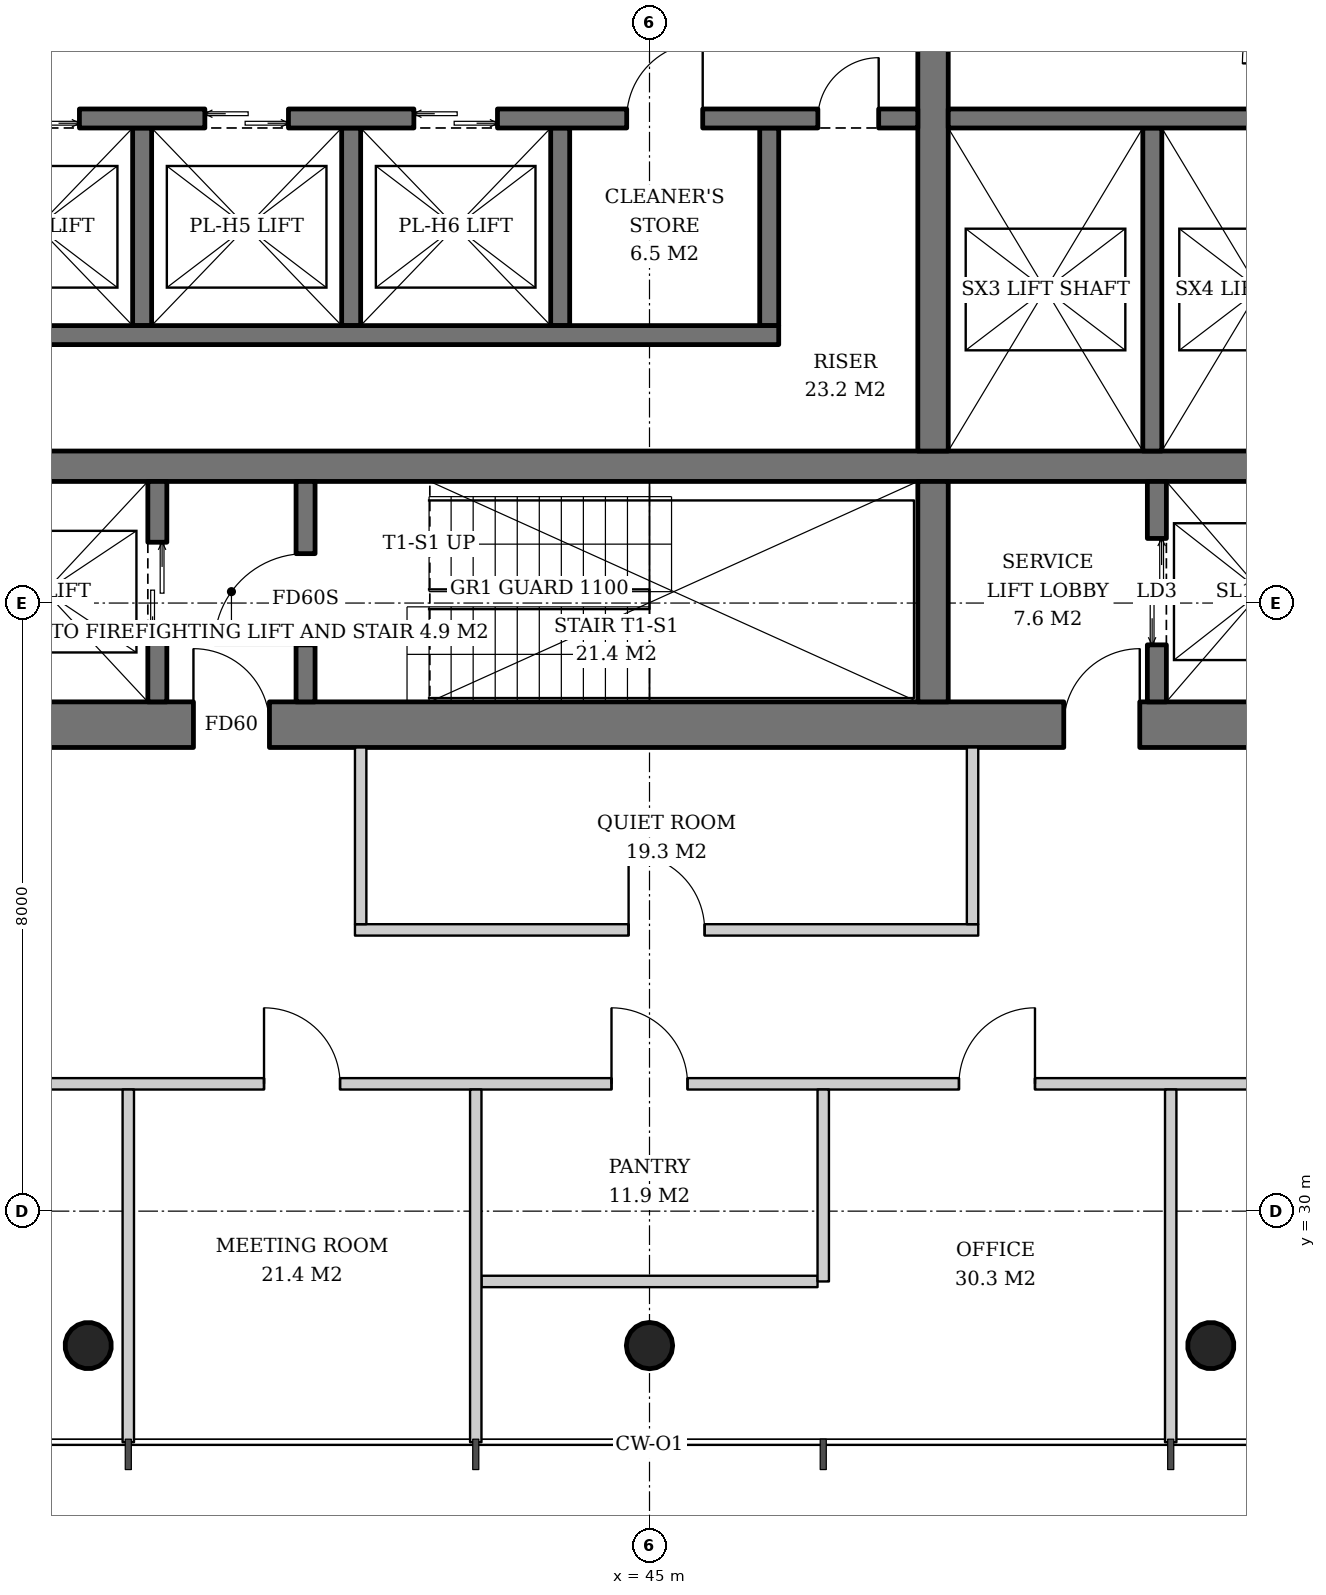
"""IFC4 building model, lengths in metres.
Left out: names, types, materials, properties, quantities, classifications, styles, units other than length and angle.
Written with IfcOpenShell. Run it as: python <this file> out.ifc"""

import sys

from ifc_helpers import new_model, si_unit, direction, frame, frame_2d, origin, origin_2d, place, context, subcontext, project, spatial, rectangle, hollow_circle, extrude, element, fill, save


model = new_model("IFC4")
c1 = context("Model", 3, precision=1e-05, world=origin(), true_north=direction((0.0, 1.0)))
c2 = subcontext(c1, "Body", "Model", "MODEL_VIEW")
j1 = project(units=[si_unit("LENGTHUNIT", "METRE"), si_unit("PLANEANGLEUNIT", "RADIAN")], contexts=[c1])
p1 = place(None, origin())
s1 = spatial("IfcSite", under=j1, at=p1, CompositionType="ELEMENT")
p2 = place(p1, origin())
s2 = spatial("IfcBuilding", under=s1, at=p2, CompositionType="ELEMENT")
p3 = place(p2, frame((0.0, 0.0, 214.8)))
s3 = spatial("IfcBuildingStorey", under=s2, at=p3, CompositionType="ELEMENT", Elevation=214.8)
p4 = place(p3, frame((37.596, 28.193, 0.0), z_axis=(0.015987237665, 0.031910269556, 0.999362868496), x_axis=(-0.894067115991, 0.447933021895, 0.0)))
e1 = element("IfcColumn", 1, at=p4, inside=s3, PredefinedType="COLUMN", context=c2, shape_type="SweptSolid", body=[
    extrude(hollow_circle(Radius=0.305, WallThickness=0.025, at=origin_2d()), origin(), (0.0, 0.0, 1.0), 3.802),
])
p5 = place(p3, frame((45.0, 28.193, 0.0), z_axis=(0.0, 0.031914348339, 0.999490607445), x_axis=(-1.0, 0.0, 0.0)))
e2 = element("IfcColumn", 2, at=p5, inside=s3, PredefinedType="COLUMN", context=c2, shape_type="SweptSolid", body=[
    extrude(hollow_circle(Radius=0.305, WallThickness=0.025, at=origin_2d()), origin(), (0.0, 0.0, 1.0), 3.802),
])
p6 = place(p3, frame((52.404, 28.193, 0.0), z_axis=(-0.015987237665, 0.031910269556, 0.999362868496), x_axis=(-0.894067115991, -0.447933021895, 0.0)))
e3 = element("IfcColumn", 3, at=p6, inside=s3, PredefinedType="COLUMN", context=c2, shape_type="SweptSolid", body=[
    extrude(hollow_circle(Radius=0.305, WallThickness=0.025, at=origin_2d()), origin(), (0.0, 0.0, 1.0), 3.802),
])
p7 = place(p3, frame((35.1, 36.4, 0.0), z_axis=(0.0, 0.0, 1.0), x_axis=(1.0, 0.0, 0.0)))
e4 = element("IfcWall", 4, at=p7, inside=s3, PredefinedType="SHEAR", context=c2, shape_type="SweptSolid", body=[
    extrude(rectangle(XDim=19.8, YDim=0.6, at=frame_2d((9.9, 0.0))), origin(), (0.0, 0.0, 1.0), 3.8),
])
p8 = place(p7, frame((3.9, 0.0, 0.0)))
e5 = element("IfcOpeningElement", 5, at=p8, cuts=e4, PredefinedType="OPENING", context=c2, shape_type="SweptSolid", body=[
    extrude(rectangle(XDim=1.0, YDim=2.1, at=frame_2d((0.5, 1.05))), frame((0.0, 0.31, 0.0), z_axis=(0.0, -1.0, 0.0), x_axis=(1.0, 0.0, 0.0)), (0.0, 0.0, 1.0), 0.62),
])
p9 = place(p7, frame((15.35, 0.0, 0.0)))
e6 = element("IfcOpeningElement", 6, at=p9, cuts=e4, PredefinedType="OPENING", context=c2, shape_type="SweptSolid", body=[
    extrude(rectangle(XDim=1.0, YDim=2.1, at=frame_2d((0.5, 1.05))), frame((0.0, 0.31, 0.0), z_axis=(0.0, -1.0, 0.0), x_axis=(1.0, 0.0, 0.0)), (0.0, 0.0, 1.0), 0.62),
])
p10 = place(p3, frame((35.7, 39.8, 0.0), z_axis=(0.0, 0.0, 1.0), x_axis=(1.0, 0.0, 0.0)))
e7 = element("IfcWall", 7, at=p10, inside=s3, PredefinedType="SHEAR", context=c2, shape_type="SweptSolid", body=[
    extrude(rectangle(XDim=18.6, YDim=0.4, at=frame_2d((9.3, 0.0))), origin(), (0.0, 0.0, 1.0), 3.8),
])
p11 = place(p3, frame((48.73, 36.7, 0.0), z_axis=(0.0, 0.0, 1.0), x_axis=(0.0, 1.0, 0.0)))
e8 = element("IfcWall", 8, at=p11, inside=s3, PredefinedType="SHEAR", context=c2, shape_type="SweptSolid", body=[
    extrude(rectangle(XDim=2.9, YDim=0.4, at=frame_2d((1.45, 0.0))), origin(), (0.0, 0.0, 1.0), 3.8),
])
p12 = place(p3, frame((48.73, 40.0, 0.0), z_axis=(0.0, 0.0, 1.0), x_axis=(0.0, 1.0, 0.0)))
e9 = element("IfcWall", 9, at=p12, inside=s3, PredefinedType="SHEAR", context=c2, shape_type="SweptSolid", body=[
    extrude(rectangle(XDim=12.0, YDim=0.4, at=frame_2d((6.0, 0.0))), origin(), (0.0, 0.0, 1.0), 3.8),
])
p13 = place(p3, frame((38.525, 36.7, 0.0), z_axis=(0.0, 0.0, 1.0), x_axis=(0.0, 1.0, 0.0)))
e10 = element("IfcWall", 10, at=p13, inside=s3, PredefinedType="SHEAR", context=c2, shape_type="SweptSolid", body=[
    extrude(rectangle(XDim=2.9, YDim=0.25, at=frame_2d((1.45, 0.0))), origin(), (0.0, 0.0, 1.0), 3.8),
])
p14 = place(p13, frame((0.8, 0.0, 0.0)))
e11 = element("IfcOpeningElement", 11, at=p14, cuts=e10, PredefinedType="OPENING", context=c2, shape_type="SweptSolid", body=[
    extrude(rectangle(XDim=1.3, YDim=2.2, at=frame_2d((0.65, 1.1))), frame((0.0, 0.135, 0.0), z_axis=(0.0, -1.0, 0.0), x_axis=(1.0, 0.0, 0.0)), (0.0, 0.0, 1.0), 0.27),
])
p15 = place(p3, frame((40.475, 36.7, 0.0), z_axis=(0.0, 0.0, 1.0), x_axis=(0.0, 1.0, 0.0)))
e12 = element("IfcWall", 12, at=p15, inside=s3, PredefinedType="SHEAR", context=c2, shape_type="SweptSolid", body=[
    extrude(rectangle(XDim=2.9, YDim=0.25, at=frame_2d((1.45, 0.0))), origin(), (0.0, 0.0, 1.0), 3.8),
])
p16 = place(p15, frame((0.75, 0.0, 0.0)))
e13 = element("IfcOpeningElement", 13, at=p16, cuts=e12, PredefinedType="OPENING", context=c2, shape_type="SweptSolid", body=[
    extrude(rectangle(XDim=1.2, YDim=2.1, at=frame_2d((0.6, 1.05))), frame((0.0, 0.135, 0.0), z_axis=(0.0, -1.0, 0.0), x_axis=(1.0, 0.0, 0.0)), (0.0, 0.0, 1.0), 0.27),
])
p17 = place(p3, frame((51.675, 36.7, 0.0), z_axis=(0.0, 0.0, 1.0), x_axis=(0.0, 1.0, 0.0)))
e14 = element("IfcWall", 14, at=p17, inside=s3, PredefinedType="SHEAR", context=c2, shape_type="SweptSolid", body=[
    extrude(rectangle(XDim=2.9, YDim=0.25, at=frame_2d((1.45, 0.0))), origin(), (0.0, 0.0, 1.0), 3.8),
])
p18 = place(p17, frame((0.75, 0.0, 0.0)))
e15 = element("IfcOpeningElement", 15, at=p18, cuts=e14, PredefinedType="OPENING", context=c2, shape_type="SweptSolid", body=[
    extrude(rectangle(XDim=1.4, YDim=2.4, at=frame_2d((0.7, 1.2))), frame((0.0, 0.135, 0.0), z_axis=(0.0, -1.0, 0.0), x_axis=(1.0, 0.0, 0.0)), (0.0, 0.0, 1.0), 0.27),
])
for number, where, z_axis, x_axis in (
    (16, (38.325, 44.25, 0.0), (0.0, 0.0, 1.0), (0.0, -1.0, 0.0)),
    (17, (41.075, 44.25, 0.0), (0.0, 0.0, 1.0), (0.0, -1.0, 0.0)),
    (18, (43.825, 44.25, 0.0), (0.0, 0.0, 1.0), (0.0, -1.0, 0.0)),
    (19, (46.575, 44.25, 0.0), (0.0, 0.0, 1.0), (0.0, -1.0, 0.0)),
):
    element("IfcWall", number, at=place(p3, frame(where, z_axis=z_axis, x_axis=x_axis)), inside=s3, PredefinedType="SHEAR", context=c2, shape_type="SweptSolid", body=[
        extrude(rectangle(XDim=2.6, YDim=0.25, at=frame_2d((1.3, 0.0))), origin(), (0.0, 0.0, 1.0), 3.8),
    ])
p19 = place(p3, frame((35.7, 41.525, 0.0), z_axis=(0.0, 0.0, 1.0), x_axis=(1.0, 0.0, 0.0)))
e20 = element("IfcWall", 20, at=p19, inside=s3, PredefinedType="SHEAR", context=c2, shape_type="SweptSolid", body=[
    extrude(rectangle(XDim=11.0, YDim=0.25, at=frame_2d((5.5, 0.0))), origin(), (0.0, 0.0, 1.0), 3.8),
])
p20 = place(p3, frame((35.7, 44.375, 0.0), z_axis=(0.0, 0.0, 1.0), x_axis=(1.0, 0.0, 0.0)))
e21 = element("IfcWall", 21, at=p20, inside=s3, PredefinedType="SHEAR", context=c2, shape_type="SweptSolid", body=[
    extrude(rectangle(XDim=12.83, YDim=0.25, at=frame_2d((6.415, 0.0))), origin(), (0.0, 0.0, 1.0), 3.8),
])
p21 = place(p20, frame((0.7, 0.0, 0.0)))
e22 = element("IfcOpeningElement", 22, at=p21, cuts=e21, PredefinedType="OPENING", context=c2, shape_type="SweptSolid", body=[
    extrude(rectangle(XDim=1.1, YDim=2.2, at=frame_2d((0.55, 1.1))), frame((0.0, 0.135, 0.0), z_axis=(0.0, -1.0, 0.0), x_axis=(1.0, 0.0, 0.0)), (0.0, 0.0, 1.0), 0.27),
])
p22 = place(p20, frame((3.45, 0.0, 0.0)))
e23 = element("IfcOpeningElement", 23, at=p22, cuts=e21, PredefinedType="OPENING", context=c2, shape_type="SweptSolid", body=[
    extrude(rectangle(XDim=1.1, YDim=2.2, at=frame_2d((0.55, 1.1))), frame((0.0, 0.135, 0.0), z_axis=(0.0, -1.0, 0.0), x_axis=(1.0, 0.0, 0.0)), (0.0, 0.0, 1.0), 0.27),
])
p23 = place(p20, frame((6.2, 0.0, 0.0)))
e24 = element("IfcOpeningElement", 24, at=p23, cuts=e21, PredefinedType="OPENING", context=c2, shape_type="SweptSolid", body=[
    extrude(rectangle(XDim=1.1, YDim=2.2, at=frame_2d((0.55, 1.1))), frame((0.0, 0.135, 0.0), z_axis=(0.0, -1.0, 0.0), x_axis=(1.0, 0.0, 0.0)), (0.0, 0.0, 1.0), 0.27),
])
p24 = place(p20, frame((9.0, 0.0, 0.0)))
e25 = element("IfcOpeningElement", 25, at=p24, cuts=e21, PredefinedType="OPENING", context=c2, shape_type="SweptSolid", body=[
    extrude(rectangle(XDim=1.0, YDim=2.1, at=frame_2d((0.5, 1.05))), frame((0.0, 0.135, 0.0), z_axis=(0.0, -1.0, 0.0), x_axis=(1.0, 0.0, 0.0)), (0.0, 0.0, 1.0), 0.27),
])
p25 = place(p20, frame((11.515, 0.0, 0.0)))
e26 = element("IfcOpeningElement", 26, at=p25, cuts=e21, PredefinedType="OPENING", context=c2, shape_type="SweptSolid", body=[
    extrude(rectangle(XDim=0.8, YDim=2.0, at=frame_2d((0.4, 1.0))), frame((0.0, 0.135, 0.0), z_axis=(0.0, -1.0, 0.0), x_axis=(1.0, 0.0, 0.0)), (0.0, 0.0, 1.0), 0.27),
])
p26 = place(p3, frame((51.615, 44.25, 0.0), z_axis=(0.0, 0.0, 1.0), x_axis=(0.0, -1.0, 0.0)))
e27 = element("IfcWall", 27, at=p26, inside=s3, PredefinedType="SHEAR", context=c2, shape_type="SweptSolid", body=[
    extrude(rectangle(XDim=4.25, YDim=0.25, at=frame_2d((2.125, 0.0))), origin(), (0.0, 0.0, 1.0), 3.8),
])
p27 = place(p3, frame((48.93, 44.375, 0.0), z_axis=(0.0, 0.0, 1.0), x_axis=(1.0, 0.0, 0.0)))
e28 = element("IfcWall", 28, at=p27, inside=s3, PredefinedType="SHEAR", context=c2, shape_type="SweptSolid", body=[
    extrude(rectangle(XDim=5.37, YDim=0.25, at=frame_2d((2.685, 0.0))), origin(), (0.0, 0.0, 1.0), 3.8),
])
p28 = place(p3, frame((41.125, 33.7, 0.0), z_axis=(0.0, 0.0, 1.0), x_axis=(1.0, 0.0, 0.0)))
e29 = element("IfcWall", 29, at=p28, inside=s3, PredefinedType="PARTITIONING", context=c2, shape_type="SweptSolid", body=[
    extrude(rectangle(XDim=8.2, YDim=0.15, at=frame_2d((4.1, 0.0))), origin(), (0.0, 0.0, 1.0), 2.867),
])
p29 = place(p28, frame((3.6, 0.0, 0.0)))
e30 = element("IfcOpeningElement", 30, at=p29, cuts=e29, PredefinedType="OPENING", context=c2, shape_type="SweptSolid", body=[
    extrude(rectangle(XDim=1.0, YDim=2.1, at=frame_2d((0.5, 1.05))), frame((0.0, 0.085, 0.0), z_axis=(0.0, -1.0, 0.0), x_axis=(1.0, 0.0, 0.0)), (0.0, 0.0, 1.0), 0.17),
])
p30 = place(p3, frame((41.2, 36.1, 0.0), z_axis=(0.0, 0.0, 1.0), x_axis=(0.0, -1.0, 0.0)))
e31 = element("IfcWall", 31, at=p30, inside=s3, PredefinedType="PARTITIONING", context=c2, shape_type="SweptSolid", body=[
    extrude(rectangle(XDim=2.325, YDim=0.15, at=frame_2d((1.163, 0.0))), origin(), (0.0, 0.0, 1.0), 3.62),
])
p31 = place(p3, frame((49.25, 36.1, 0.0), z_axis=(0.0, 0.0, 1.0), x_axis=(0.0, -1.0, 0.0)))
e32 = element("IfcWall", 32, at=p31, inside=s3, PredefinedType="PARTITIONING", context=c2, shape_type="SweptSolid", body=[
    extrude(rectangle(XDim=2.325, YDim=0.15, at=frame_2d((1.163, 0.0))), origin(), (0.0, 0.0, 1.0), 2.867),
])
p32 = place(p3, frame((42.789, 29.075, 0.0), z_axis=(0.0, 0.0, 1.0), x_axis=(1.0, 0.0, 0.0)))
e33 = element("IfcWall", 33, at=p32, inside=s3, PredefinedType="PARTITIONING", context=c2, shape_type="SweptSolid", body=[
    extrude(rectangle(XDim=4.421, YDim=0.15, at=frame_2d((2.211, 0.0))), origin(), (0.0, 0.0, 1.0), 2.867),
])
p33 = place(p3, frame((32.164, 31.675, 0.0), z_axis=(0.0, 0.0, 1.0), x_axis=(1.0, 0.0, 0.0)))
e34 = element("IfcWall", 34, at=p33, inside=s3, PredefinedType="PARTITIONING", context=c2, shape_type="SweptSolid", body=[
    extrude(rectangle(XDim=25.671, YDim=0.15, at=frame_2d((12.836, 0.0))), origin(), (0.0, 0.0, 1.0), 2.867),
])
p34 = place(p33, frame((3.193, 0.0, 0.0)))
e35 = element("IfcOpeningElement", 35, at=p34, cuts=e34, PredefinedType="OPENING", context=c2, shape_type="SweptSolid", body=[
    extrude(rectangle(XDim=1.0, YDim=2.1, at=frame_2d((0.5, 1.05))), frame((0.0, 0.085, 0.0), z_axis=(0.0, -1.0, 0.0), x_axis=(1.0, 0.0, 0.0)), (0.0, 0.0, 1.0), 0.17),
])
p35 = place(p33, frame((7.764, 0.0, 0.0)))
e36 = element("IfcOpeningElement", 36, at=p35, cuts=e34, PredefinedType="OPENING", context=c2, shape_type="SweptSolid", body=[
    extrude(rectangle(XDim=1.0, YDim=2.1, at=frame_2d((0.5, 1.05))), frame((0.0, 0.085, 0.0), z_axis=(0.0, -1.0, 0.0), x_axis=(1.0, 0.0, 0.0)), (0.0, 0.0, 1.0), 0.17),
])
p36 = place(p33, frame((12.336, 0.0, 0.0)))
e37 = element("IfcOpeningElement", 37, at=p36, cuts=e34, PredefinedType="OPENING", context=c2, shape_type="SweptSolid", body=[
    extrude(rectangle(XDim=1.0, YDim=2.1, at=frame_2d((0.5, 1.05))), frame((0.0, 0.085, 0.0), z_axis=(0.0, -1.0, 0.0), x_axis=(1.0, 0.0, 0.0)), (0.0, 0.0, 1.0), 0.17),
])
p37 = place(p33, frame((16.907, 0.0, 0.0)))
e38 = element("IfcOpeningElement", 38, at=p37, cuts=e34, PredefinedType="OPENING", context=c2, shape_type="SweptSolid", body=[
    extrude(rectangle(XDim=1.0, YDim=2.1, at=frame_2d((0.5, 1.05))), frame((0.0, 0.085, 0.0), z_axis=(0.0, -1.0, 0.0), x_axis=(1.0, 0.0, 0.0)), (0.0, 0.0, 1.0), 0.17),
])
p38 = place(p33, frame((21.479, 0.0, 0.0)))
e39 = element("IfcOpeningElement", 39, at=p38, cuts=e34, PredefinedType="OPENING", context=c2, shape_type="SweptSolid", body=[
    extrude(rectangle(XDim=1.0, YDim=2.1, at=frame_2d((0.5, 1.05))), frame((0.0, 0.085, 0.0), z_axis=(0.0, -1.0, 0.0), x_axis=(1.0, 0.0, 0.0)), (0.0, 0.0, 1.0), 0.17),
])
for number, where, z_axis, x_axis in (
    (40, (38.143, 31.6, 0.0), (0.0, 0.0, 1.0), (0.0, -1.0, 0.0)),
    (41, (42.714, 31.6, 0.0), (0.0, 0.0, 1.0), (0.0, -1.0, 0.0)),
):
    element("IfcWall", number, at=place(p3, frame(where, z_axis=z_axis, x_axis=x_axis)), inside=s3, PredefinedType="PARTITIONING", context=c2, shape_type="SweptSolid", body=[
        extrude(rectangle(XDim=4.64, YDim=0.15, at=frame_2d((2.32, 0.0))), origin(), (0.0, 0.0, 1.0), 3.12),
    ])
p39 = place(p3, frame((47.286, 31.6, 0.0), z_axis=(0.0, 0.0, 1.0), x_axis=(0.0, -1.0, 0.0)))
e42 = element("IfcWall", 42, at=p39, inside=s3, PredefinedType="PARTITIONING", context=c2, shape_type="SweptSolid", body=[
    extrude(rectangle(XDim=2.525, YDim=0.15, at=frame_2d((1.263, 0.0))), origin(), (0.0, 0.0, 1.0), 3.62),
])
p40 = place(p3, frame((51.857, 31.6, 0.0), z_axis=(0.0, 0.0, 1.0), x_axis=(0.0, -1.0, 0.0)))
e43 = element("IfcWall", 43, at=p40, inside=s3, PredefinedType="PARTITIONING", context=c2, shape_type="SweptSolid", body=[
    extrude(rectangle(XDim=4.64, YDim=0.15, at=frame_2d((2.32, 0.0))), origin(), (0.0, 0.0, 1.0), 3.12),
])
p41 = place(p14, origin())
e44 = element("IfcDoor", 44, at=p41, inside=s3, OperationType="DOUBLE_DOOR_SLIDING", PredefinedType="DOOR", context=c2, shape_type="SweptSolid", body=[
    extrude(rectangle(XDim=1.3, YDim=2.2, at=frame_2d((0.65, 1.1))), frame((0.0, 0.025, 0.0), z_axis=(0.0, -1.0, 0.0), x_axis=(1.0, 0.0, 0.0)), (0.0, 0.0, 1.0), 0.05),
])
fill(e11, e44)
p42 = place(p16, origin())
e45 = element("IfcDoor", 45, at=p42, inside=s3, OperationType="SINGLE_SWING_LEFT", PredefinedType="DOOR", context=c2, shape_type="SweptSolid", body=[
    extrude(rectangle(XDim=1.2, YDim=2.1, at=frame_2d((0.6, 1.05))), frame((0.0, 0.025, 0.0), z_axis=(0.0, -1.0, 0.0), x_axis=(1.0, 0.0, 0.0)), (0.0, 0.0, 1.0), 0.05),
])
fill(e13, e45)
p43 = place(p18, origin())
e46 = element("IfcDoor", 46, at=p43, inside=s3, OperationType="DOUBLE_DOOR_SLIDING", PredefinedType="DOOR", context=c2, shape_type="SweptSolid", body=[
    extrude(rectangle(XDim=1.4, YDim=2.4, at=frame_2d((0.7, 1.2))), frame((0.0, 0.025, 0.0), z_axis=(0.0, -1.0, 0.0), x_axis=(1.0, 0.0, 0.0)), (0.0, 0.0, 1.0), 0.05),
])
fill(e15, e46)
p44 = place(p21, origin())
e47 = element("IfcDoor", 47, at=p44, inside=s3, OperationType="DOUBLE_DOOR_SLIDING", PredefinedType="DOOR", context=c2, shape_type="SweptSolid", body=[
    extrude(rectangle(XDim=1.1, YDim=2.2, at=frame_2d((0.55, 1.1))), frame((0.0, 0.025, 0.0), z_axis=(0.0, -1.0, 0.0), x_axis=(1.0, 0.0, 0.0)), (0.0, 0.0, 1.0), 0.05),
])
fill(e22, e47)
p45 = place(p22, origin())
e48 = element("IfcDoor", 48, at=p45, inside=s3, OperationType="DOUBLE_DOOR_SLIDING", PredefinedType="DOOR", context=c2, shape_type="SweptSolid", body=[
    extrude(rectangle(XDim=1.1, YDim=2.2, at=frame_2d((0.55, 1.1))), frame((0.0, 0.025, 0.0), z_axis=(0.0, -1.0, 0.0), x_axis=(1.0, 0.0, 0.0)), (0.0, 0.0, 1.0), 0.05),
])
fill(e23, e48)
p46 = place(p23, origin())
e49 = element("IfcDoor", 49, at=p46, inside=s3, OperationType="DOUBLE_DOOR_SLIDING", PredefinedType="DOOR", context=c2, shape_type="SweptSolid", body=[
    extrude(rectangle(XDim=1.1, YDim=2.2, at=frame_2d((0.55, 1.1))), frame((0.0, 0.025, 0.0), z_axis=(0.0, -1.0, 0.0), x_axis=(1.0, 0.0, 0.0)), (0.0, 0.0, 1.0), 0.05),
])
fill(e24, e49)
p47 = place(p24, origin())
e50 = element("IfcDoor", 50, at=p47, inside=s3, OperationType="SINGLE_SWING_RIGHT", PredefinedType="DOOR", context=c2, shape_type="SweptSolid", body=[
    extrude(rectangle(XDim=1.0, YDim=2.1, at=frame_2d((0.5, 1.05))), frame((0.0, 0.025, 0.0), z_axis=(0.0, -1.0, 0.0), x_axis=(1.0, 0.0, 0.0)), (0.0, 0.0, 1.0), 0.05),
])
fill(e25, e50)
p48 = place(p25, origin())
e51 = element("IfcDoor", 51, at=p48, inside=s3, OperationType="SINGLE_SWING_RIGHT", PredefinedType="DOOR", context=c2, shape_type="SweptSolid", body=[
    extrude(rectangle(XDim=0.8, YDim=2.0, at=frame_2d((0.4, 1.0))), frame((0.0, 0.025, 0.0), z_axis=(0.0, -1.0, 0.0), x_axis=(1.0, 0.0, 0.0)), (0.0, 0.0, 1.0), 0.05),
])
fill(e26, e51)
p49 = place(p8, origin())
e52 = element("IfcDoor", 52, at=p49, inside=s3, OperationType="SINGLE_SWING_LEFT", PredefinedType="DOOR", context=c2, shape_type="SweptSolid", body=[
    extrude(rectangle(XDim=1.0, YDim=2.1, at=frame_2d((0.5, 1.05))), frame((0.0, 0.025, 0.0), z_axis=(0.0, -1.0, 0.0), x_axis=(1.0, 0.0, 0.0)), (0.0, 0.0, 1.0), 0.05),
])
fill(e5, e52)
p50 = place(p9, origin())
e53 = element("IfcDoor", 53, at=p50, inside=s3, OperationType="SINGLE_SWING_RIGHT", PredefinedType="DOOR", context=c2, shape_type="SweptSolid", body=[
    extrude(rectangle(XDim=1.0, YDim=2.1, at=frame_2d((0.5, 1.05))), frame((0.0, 0.025, 0.0), z_axis=(0.0, -1.0, 0.0), x_axis=(1.0, 0.0, 0.0)), (0.0, 0.0, 1.0), 0.05),
])
fill(e6, e53)
p51 = place(p29, origin())
e54 = element("IfcDoor", 54, at=p51, inside=s3, OperationType="SINGLE_SWING_LEFT", PredefinedType="DOOR", context=c2, shape_type="SweptSolid", body=[
    extrude(rectangle(XDim=1.0, YDim=2.1, at=frame_2d((0.5, 1.05))), frame((0.0, 0.025, 0.0), z_axis=(0.0, -1.0, 0.0), x_axis=(1.0, 0.0, 0.0)), (0.0, 0.0, 1.0), 0.05),
])
fill(e30, e54)
p52 = place(p35, origin())
e55 = element("IfcDoor", 55, at=p52, inside=s3, OperationType="SINGLE_SWING_LEFT", PredefinedType="DOOR", context=c2, shape_type="SweptSolid", body=[
    extrude(rectangle(XDim=1.0, YDim=2.1, at=frame_2d((0.5, 1.05))), frame((0.0, 0.025, 0.0), z_axis=(0.0, -1.0, 0.0), x_axis=(1.0, 0.0, 0.0)), (0.0, 0.0, 1.0), 0.05),
])
fill(e36, e55)
p53 = place(p36, origin())
e56 = element("IfcDoor", 56, at=p53, inside=s3, OperationType="SINGLE_SWING_LEFT", PredefinedType="DOOR", context=c2, shape_type="SweptSolid", body=[
    extrude(rectangle(XDim=1.0, YDim=2.1, at=frame_2d((0.5, 1.05))), frame((0.0, 0.025, 0.0), z_axis=(0.0, -1.0, 0.0), x_axis=(1.0, 0.0, 0.0)), (0.0, 0.0, 1.0), 0.05),
])
fill(e37, e56)
p54 = place(p37, origin())
e57 = element("IfcDoor", 57, at=p54, inside=s3, OperationType="SINGLE_SWING_RIGHT", PredefinedType="DOOR", context=c2, shape_type="SweptSolid", body=[
    extrude(rectangle(XDim=1.0, YDim=2.1, at=frame_2d((0.5, 1.05))), frame((0.0, 0.025, 0.0), z_axis=(0.0, -1.0, 0.0), x_axis=(1.0, 0.0, 0.0)), (0.0, 0.0, 1.0), 0.05),
])
fill(e38, e57)
save(model, sys.argv[1])
